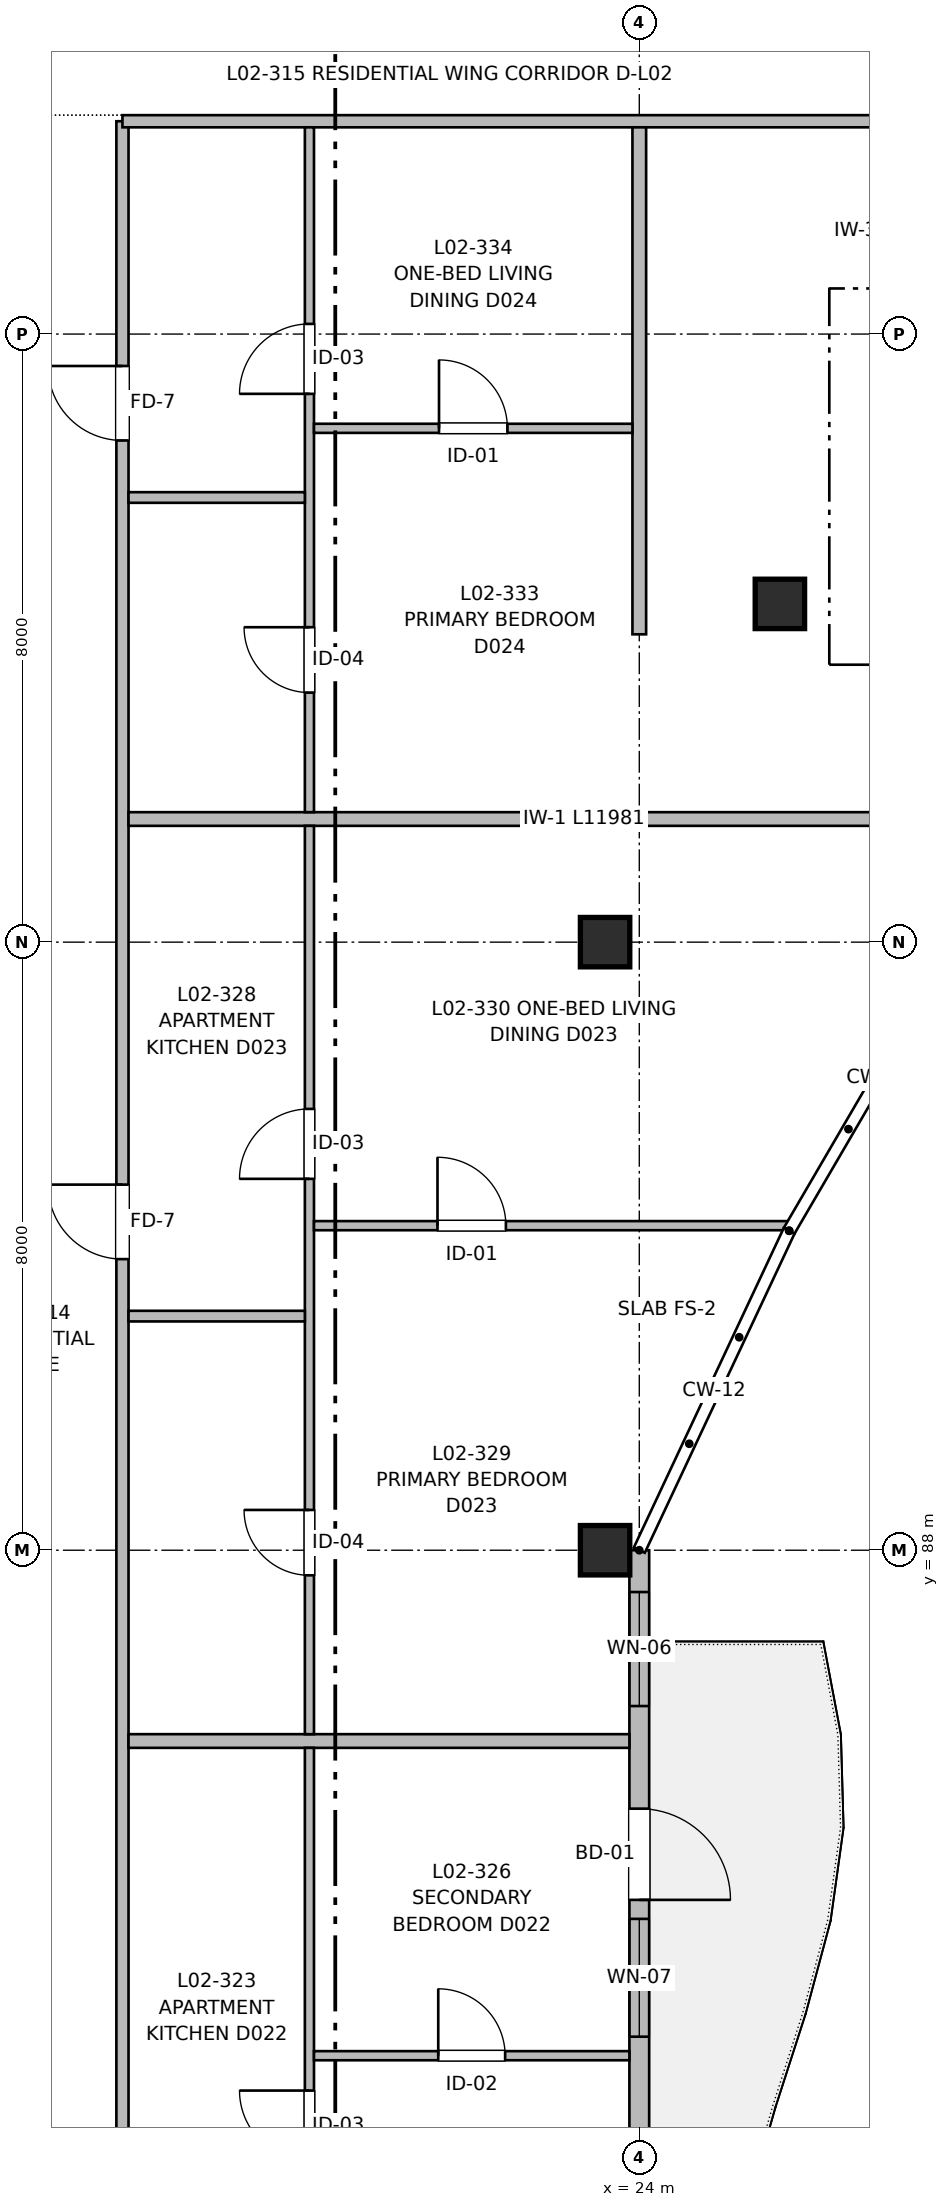
"""IFC4 building model, lengths in metres.
Left out: names, types, materials, properties, quantities, classifications, styles, units other than length and angle.
Written with IfcOpenShell. Run it as: python <this file> out.ifc"""

import sys

from ifc_helpers import new_model, si_unit, direction, frame, frame_2d, origin, origin_2d, place, context, subcontext, project, spatial, rectangle, extrude, element, fill, save


model = new_model("IFC4")
c1 = context("Model", 3, precision=1e-05, world=origin(), true_north=direction((0.0, 1.0)))
c2 = subcontext(c1, "Body", "Model", "MODEL_VIEW")
j1 = project(units=[si_unit("LENGTHUNIT", "METRE"), si_unit("PLANEANGLEUNIT", "RADIAN")], contexts=[c1])
p1 = place(None, origin())
s1 = spatial("IfcSite", under=j1, at=p1, CompositionType="ELEMENT")
p2 = place(p1, origin())
s2 = spatial("IfcBuilding", under=s1, at=p2, CompositionType="ELEMENT")
p3 = place(p2, frame((0.0, 0.0, 7.36)))
s3 = spatial("IfcBuildingStorey", under=s2, at=p3, CompositionType="ELEMENT", Elevation=7.36)
for number, where, z_axis, x_axis in (
    (1, (23.55, 88.0, 0.0), (0.0, 0.0, 1.0), (1.0, 0.0, 0.0)),
    (2, (23.55, 96.0, 0.0), (0.0, 0.0, 1.0), (1.0, 0.0, 0.0)),
    (3, (25.85, 100.45, 0.0), (0.0, 0.0, 1.0), (1.0, 0.0, 0.0)),
):
    element("IfcColumn", number, at=place(p3, frame(where, z_axis=z_axis, x_axis=x_axis)), inside=s3, PredefinedType="COLUMN", context=c2, shape_type="SweptSolid", body=[
        extrude(rectangle(XDim=0.65, YDim=0.65, at=origin_2d()), origin(), (0.0, 0.0, 1.0), 3.2),
    ])
p4 = place(p3, frame((24.0, 88.0, 0.0), z_axis=(0.0, 0.0, 1.0), x_axis=(0.0, -1.0, 0.0)))
e4 = element("IfcWall", 4, at=p4, inside=s3, PredefinedType="SOLIDWALL", context=c2, shape_type="SweptSolid", body=[
    extrude(rectangle(XDim=32.0, YDim=0.26, at=frame_2d((16.0, 0.0))), origin(), (0.0, 0.0, 1.0), 2.98),
])
p5 = place(p4, frame((3.4, 0.0, 0.0)))
e5 = element("IfcOpeningElement", 5, at=p5, cuts=e4, PredefinedType="OPENING", context=c2, shape_type="SweptSolid", body=[
    extrude(rectangle(XDim=1.2, YDim=2.2, at=frame_2d((0.6, 1.1))), frame((0.0, 0.14, 0.0), z_axis=(0.0, -1.0, 0.0), x_axis=(1.0, 0.0, 0.0)), (0.0, 0.0, 1.0), 0.28),
])
p6 = place(p4, frame((4.85, 0.0, 0.82)))
e6 = element("IfcOpeningElement", 6, at=p6, cuts=e4, PredefinedType="OPENING", context=c2, shape_type="SweptSolid", body=[
    extrude(rectangle(XDim=1.55, YDim=1.4, at=frame_2d((0.775, 0.7))), frame((0.0, 0.14, 0.0), z_axis=(0.0, -1.0, 0.0), x_axis=(1.0, 0.0, 0.0)), (0.0, 0.0, 1.0), 0.28),
])
p7 = place(p4, frame((10.4, 0.0, 0.82)))
e7 = element("IfcOpeningElement", 7, at=p7, cuts=e4, PredefinedType="OPENING", context=c2, shape_type="SweptSolid", body=[
    extrude(rectangle(XDim=1.5, YDim=1.4, at=frame_2d((0.75, 0.7))), frame((0.0, 0.14, 0.0), z_axis=(0.0, -1.0, 0.0), x_axis=(1.0, 0.0, 0.0)), (0.0, 0.0, 1.0), 0.28),
])
p8 = place(p4, frame((19.225, 0.0, 0.82)))
e8 = element("IfcOpeningElement", 8, at=p8, cuts=e4, PredefinedType="OPENING", context=c2, shape_type="SweptSolid", body=[
    extrude(rectangle(XDim=1.55, YDim=1.4, at=frame_2d((0.775, 0.7))), frame((0.0, 0.14, 0.0), z_axis=(0.0, -1.0, 0.0), x_axis=(1.0, 0.0, 0.0)), (0.0, 0.0, 1.0), 0.28),
])
p9 = place(p4, frame((27.3, 0.0, 0.87)))
e9 = element("IfcOpeningElement", 9, at=p9, cuts=e4, PredefinedType="OPENING", context=c2, shape_type="SweptSolid", body=[
    extrude(rectangle(XDim=1.4, YDim=1.35, at=frame_2d((0.7, 0.675))), frame((0.0, 0.14, 0.0), z_axis=(0.0, -1.0, 0.0), x_axis=(1.0, 0.0, 0.0)), (0.0, 0.0, 1.0), 0.28),
])
p10 = place(p4, frame((24.493, 0.0, 0.82)))
e10 = element("IfcOpeningElement", 10, at=p10, cuts=e4, PredefinedType="OPENING", context=c2, shape_type="SweptSolid", body=[
    extrude(rectangle(XDim=1.5, YDim=1.4, at=frame_2d((0.75, 0.7))), frame((0.0, 0.14, 0.0), z_axis=(0.0, -1.0, 0.0), x_axis=(1.0, 0.0, 0.0)), (0.0, 0.0, 1.0), 0.28),
])
p11 = place(p4, frame((13.68, 0.0, 0.82)))
e11 = element("IfcOpeningElement", 11, at=p11, cuts=e4, PredefinedType="OPENING", context=c2, shape_type="SweptSolid", body=[
    extrude(rectangle(XDim=1.5, YDim=1.4, at=frame_2d((0.75, 0.7))), frame((0.0, 0.14, 0.0), z_axis=(0.0, -1.0, 0.0), x_axis=(1.0, 0.0, 0.0)), (0.0, 0.0, 1.0), 0.28),
])
p12 = place(p4, frame((0.55, 0.0, 0.82)))
e12 = element("IfcOpeningElement", 12, at=p12, cuts=e4, PredefinedType="OPENING", context=c2, shape_type="SweptSolid", body=[
    extrude(rectangle(XDim=1.5, YDim=1.4, at=frame_2d((0.75, 0.7))), frame((0.0, 0.14, 0.0), z_axis=(0.0, -1.0, 0.0), x_axis=(1.0, 0.0, 0.0)), (0.0, 0.0, 1.0), 0.28),
])
p13 = place(p3, frame((17.2, 56.18, 0.0), z_axis=(0.0, 0.0, 1.0), x_axis=(0.0, 1.0, 0.0)))
e13 = element("IfcWall", 13, at=p13, inside=s3, PredefinedType="PARTITIONING", context=c2, shape_type="SweptSolid", body=[
    extrude(rectangle(XDim=50.62, YDim=0.16, at=frame_2d((25.31, 0.0))), origin(), (0.0, 0.0, 1.0), 2.935),
])
p14 = place(p13, frame((7.68, 0.0, 0.0)))
e14 = element("IfcOpeningElement", 14, at=p14, cuts=e13, PredefinedType="OPENING", context=c2, shape_type="SweptSolid", body=[
    extrude(rectangle(XDim=0.98, YDim=2.15, at=frame_2d((0.49, 1.075))), frame((0.0, 0.09, 0.0), z_axis=(0.0, -1.0, 0.0), x_axis=(1.0, 0.0, 0.0)), (0.0, 0.0, 1.0), 0.18),
])
p15 = place(p13, frame((22.43, 0.0, 0.0)))
e15 = element("IfcOpeningElement", 15, at=p15, cuts=e13, PredefinedType="OPENING", context=c2, shape_type="SweptSolid", body=[
    extrude(rectangle(XDim=0.98, YDim=2.15, at=frame_2d((0.49, 1.075))), frame((0.0, 0.09, 0.0), z_axis=(0.0, -1.0, 0.0), x_axis=(1.0, 0.0, 0.0)), (0.0, 0.0, 1.0), 0.18),
])
p16 = place(p13, frame((35.65, 0.0, 0.0)))
e16 = element("IfcOpeningElement", 16, at=p16, cuts=e13, PredefinedType="OPENING", context=c2, shape_type="SweptSolid", body=[
    extrude(rectangle(XDim=0.98, YDim=2.15, at=frame_2d((0.49, 1.075))), frame((0.0, 0.09, 0.0), z_axis=(0.0, -1.0, 0.0), x_axis=(1.0, 0.0, 0.0)), (0.0, 0.0, 1.0), 0.18),
])
p17 = place(p13, frame((46.42, 0.0, 0.0)))
e17 = element("IfcOpeningElement", 17, at=p17, cuts=e13, PredefinedType="OPENING", context=c2, shape_type="SweptSolid", body=[
    extrude(rectangle(XDim=0.98, YDim=2.15, at=frame_2d((0.49, 1.075))), frame((0.0, 0.09, 0.0), z_axis=(0.0, -1.0, 0.0), x_axis=(1.0, 0.0, 0.0)), (0.0, 0.0, 1.0), 0.18),
])
p18 = place(p3, frame((17.2, 106.8, 0.0), z_axis=(0.0, 0.0, 1.0), x_axis=(1.0, 0.0, 0.0)))
e18 = element("IfcWall", 18, at=p18, inside=s3, PredefinedType="PARTITIONING", context=c2, shape_type="SweptSolid", body=[
    extrude(rectangle(XDim=17.62, YDim=0.16, at=frame_2d((8.81, 0.0))), origin(), (0.0, 0.0, 1.0), 2.935),
])
p19 = place(p18, frame((13.075, 0.0, 0.0)))
e19 = element("IfcOpeningElement", 19, at=p19, cuts=e18, PredefinedType="OPENING", context=c2, shape_type="SweptSolid", body=[
    extrude(rectangle(XDim=1.05, YDim=2.15, at=frame_2d((0.525, 1.075))), frame((0.0, 0.09, 0.0), z_axis=(0.0, -1.0, 0.0), x_axis=(1.0, 0.0, 0.0)), (0.0, 0.0, 1.0), 0.18),
])
p20 = place(p3, frame((24.0, 100.05, 0.0), z_axis=(0.0, 0.0, 1.0), x_axis=(0.0, 1.0, 0.0)))
e20 = element("IfcWall", 20, at=p20, inside=s3, PredefinedType="PARTITIONING", context=c2, shape_type="SweptSolid", body=[
    extrude(rectangle(XDim=6.67, YDim=0.18, at=frame_2d((3.335, 0.0))), origin(), (0.0, 0.0, 1.0), 2.935),
])
p21 = place(p3, frame((17.28, 85.49, 0.0), z_axis=(0.0, 0.0, 1.0), x_axis=(1.0, 0.0, 0.0)))
e21 = element("IfcWall", 21, at=p21, inside=s3, PredefinedType="PARTITIONING", context=c2, shape_type="SweptSolid", body=[
    extrude(rectangle(XDim=6.59, YDim=0.18, at=frame_2d((3.295, 0.0))), origin(), (0.0, 0.0, 1.0), 2.935),
])
p22 = place(p3, frame((17.28, 97.62, 0.0), z_axis=(0.0, 0.0, 1.0), x_axis=(1.0, 0.0, 0.0)))
e22 = element("IfcWall", 22, at=p22, inside=s3, PredefinedType="PARTITIONING", context=c2, shape_type="SweptSolid", body=[
    extrude(rectangle(XDim=11.981, YDim=0.18, at=frame_2d((5.991, 0.0))), origin(), (0.0, 0.0, 1.0), 2.935),
])
p23 = place(p3, frame((19.66, 71.43, 0.0), z_axis=(0.0, 0.0, 1.0), x_axis=(0.0, 1.0, 0.0)))
e23 = element("IfcWall", 23, at=p23, inside=s3, PredefinedType="PARTITIONING", context=c2, shape_type="SweptSolid", body=[
    extrude(rectangle(XDim=13.97, YDim=0.12, at=frame_2d((6.985, 0.0))), origin(), (0.0, 0.0, 1.0), 2.935),
])
p24 = place(p23, frame((2.443, 0.0, 0.0)))
e24 = element("IfcOpeningElement", 24, at=p24, cuts=e23, PredefinedType="OPENING", context=c2, shape_type="SweptSolid", body=[
    extrude(rectangle(XDim=0.86, YDim=2.1, at=frame_2d((0.43, 1.05))), frame((0.0, 0.07, 0.0), z_axis=(0.0, -1.0, 0.0), x_axis=(1.0, 0.0, 0.0)), (0.0, 0.0, 1.0), 0.14),
])
p25 = place(p23, frame((8.541, 0.0, 0.0)))
e25 = element("IfcOpeningElement", 25, at=p25, cuts=e23, PredefinedType="OPENING", context=c2, shape_type="SweptSolid", body=[
    extrude(rectangle(XDim=0.92, YDim=2.1, at=frame_2d((0.46, 1.05))), frame((0.0, 0.07, 0.0), z_axis=(0.0, -1.0, 0.0), x_axis=(1.0, 0.0, 0.0)), (0.0, 0.0, 1.0), 0.14),
])
p26 = place(p3, frame((19.72, 81.35, 0.0), z_axis=(0.0, 0.0, 1.0), x_axis=(1.0, 0.0, 0.0)))
e26 = element("IfcWall", 26, at=p26, inside=s3, PredefinedType="PARTITIONING", context=c2, shape_type="SweptSolid", body=[
    extrude(rectangle(XDim=4.15, YDim=0.12, at=frame_2d((2.075, 0.0))), origin(), (0.0, 0.0, 1.0), 2.935),
])
p27 = place(p26, frame((1.635, 0.0, 0.0)))
e27 = element("IfcOpeningElement", 27, at=p27, cuts=e26, PredefinedType="OPENING", context=c2, shape_type="SweptSolid", body=[
    extrude(rectangle(XDim=0.88, YDim=2.1, at=frame_2d((0.44, 1.05))), frame((0.0, 0.07, 0.0), z_axis=(0.0, -1.0, 0.0), x_axis=(1.0, 0.0, 0.0)), (0.0, 0.0, 1.0), 0.14),
])
p28 = place(p3, frame((19.66, 85.58, 0.0), z_axis=(0.0, 0.0, 1.0), x_axis=(0.0, 1.0, 0.0)))
e28 = element("IfcWall", 28, at=p28, inside=s3, PredefinedType="PARTITIONING", context=c2, shape_type="SweptSolid", body=[
    extrude(rectangle(XDim=11.95, YDim=0.12, at=frame_2d((5.975, 0.0))), origin(), (0.0, 0.0, 1.0), 2.935),
])
p29 = place(p28, frame((2.09, 0.0, 0.0)))
e29 = element("IfcOpeningElement", 29, at=p29, cuts=e28, PredefinedType="OPENING", context=c2, shape_type="SweptSolid", body=[
    extrude(rectangle(XDim=0.86, YDim=2.1, at=frame_2d((0.43, 1.05))), frame((0.0, 0.07, 0.0), z_axis=(0.0, -1.0, 0.0), x_axis=(1.0, 0.0, 0.0)), (0.0, 0.0, 1.0), 0.14),
])
p30 = place(p28, frame((7.306, 0.0, 0.0)))
e30 = element("IfcOpeningElement", 30, at=p30, cuts=e28, PredefinedType="OPENING", context=c2, shape_type="SweptSolid", body=[
    extrude(rectangle(XDim=0.92, YDim=2.1, at=frame_2d((0.46, 1.05))), frame((0.0, 0.07, 0.0), z_axis=(0.0, -1.0, 0.0), x_axis=(1.0, 0.0, 0.0)), (0.0, 0.0, 1.0), 0.14),
])
p31 = place(p3, frame((17.28, 91.08, 0.0), z_axis=(0.0, 0.0, 1.0), x_axis=(1.0, 0.0, 0.0)))
e31 = element("IfcWall", 31, at=p31, inside=s3, PredefinedType="PARTITIONING", context=c2, shape_type="SweptSolid", body=[
    extrude(rectangle(XDim=2.32, YDim=0.14, at=frame_2d((1.16, 0.0))), origin(), (0.0, 0.0, 1.0), 2.935),
])
p32 = place(p3, frame((19.72, 92.27, 0.0), z_axis=(0.0, 0.0, 1.0), x_axis=(1.0, 0.0, 0.0)))
e32 = element("IfcWall", 32, at=p32, inside=s3, PredefinedType="PARTITIONING", context=c2, shape_type="SweptSolid", body=[
    extrude(rectangle(XDim=6.245, YDim=0.12, at=frame_2d((3.123, 0.0))), origin(), (0.0, 0.0, 1.0), 2.935),
])
p33 = place(p32, frame((1.625, 0.0, 0.0)))
e33 = element("IfcOpeningElement", 33, at=p33, cuts=e32, PredefinedType="OPENING", context=c2, shape_type="SweptSolid", body=[
    extrude(rectangle(XDim=0.9, YDim=2.1, at=frame_2d((0.45, 1.05))), frame((0.0, 0.07, 0.0), z_axis=(0.0, -1.0, 0.0), x_axis=(1.0, 0.0, 0.0)), (0.0, 0.0, 1.0), 0.14),
])
p34 = place(p3, frame((19.66, 97.71, 0.0), z_axis=(0.0, 0.0, 1.0), x_axis=(0.0, 1.0, 0.0)))
e34 = element("IfcWall", 34, at=p34, inside=s3, PredefinedType="PARTITIONING", context=c2, shape_type="SweptSolid", body=[
    extrude(rectangle(XDim=9.01, YDim=0.12, at=frame_2d((4.505, 0.0))), origin(), (0.0, 0.0, 1.0), 2.935),
])
p35 = place(p34, frame((1.573, 0.0, 0.0)))
e35 = element("IfcOpeningElement", 35, at=p35, cuts=e34, PredefinedType="OPENING", context=c2, shape_type="SweptSolid", body=[
    extrude(rectangle(XDim=0.86, YDim=2.1, at=frame_2d((0.43, 1.05))), frame((0.0, 0.07, 0.0), z_axis=(0.0, -1.0, 0.0), x_axis=(1.0, 0.0, 0.0)), (0.0, 0.0, 1.0), 0.14),
])
p36 = place(p34, frame((5.504, 0.0, 0.0)))
e36 = element("IfcOpeningElement", 36, at=p36, cuts=e34, PredefinedType="OPENING", context=c2, shape_type="SweptSolid", body=[
    extrude(rectangle(XDim=0.92, YDim=2.1, at=frame_2d((0.46, 1.05))), frame((0.0, 0.07, 0.0), z_axis=(0.0, -1.0, 0.0), x_axis=(1.0, 0.0, 0.0)), (0.0, 0.0, 1.0), 0.14),
])
p37 = place(p3, frame((17.28, 101.85, 0.0), z_axis=(0.0, 0.0, 1.0), x_axis=(1.0, 0.0, 0.0)))
e37 = element("IfcWall", 37, at=p37, inside=s3, PredefinedType="PARTITIONING", context=c2, shape_type="SweptSolid", body=[
    extrude(rectangle(XDim=2.32, YDim=0.14, at=frame_2d((1.16, 0.0))), origin(), (0.0, 0.0, 1.0), 2.935),
])
p38 = place(p3, frame((19.72, 102.76, 0.0), z_axis=(0.0, 0.0, 1.0), x_axis=(1.0, 0.0, 0.0)))
e38 = element("IfcWall", 38, at=p38, inside=s3, PredefinedType="PARTITIONING", context=c2, shape_type="SweptSolid", body=[
    extrude(rectangle(XDim=4.19, YDim=0.12, at=frame_2d((2.095, 0.0))), origin(), (0.0, 0.0, 1.0), 2.935),
])
p39 = place(p38, frame((1.645, 0.0, 0.0)))
e39 = element("IfcOpeningElement", 39, at=p39, cuts=e38, PredefinedType="OPENING", context=c2, shape_type="SweptSolid", body=[
    extrude(rectangle(XDim=0.9, YDim=2.1, at=frame_2d((0.45, 1.05))), frame((0.0, 0.07, 0.0), z_axis=(0.0, -1.0, 0.0), x_axis=(1.0, 0.0, 0.0)), (0.0, 0.0, 1.0), 0.14),
])
p40 = place(p5, origin())
e40 = element("IfcDoor", 40, at=p40, inside=s3, OperationType="SINGLE_SWING_RIGHT", PredefinedType="DOOR", context=c2, shape_type="SweptSolid", body=[
    extrude(rectangle(XDim=1.2, YDim=2.2, at=frame_2d((0.6, 1.1))), frame((0.0, 0.025, 0.0), z_axis=(0.0, -1.0, 0.0), x_axis=(1.0, 0.0, 0.0)), (0.0, 0.0, 1.0), 0.05),
])
fill(e5, e40)
p41 = place(p6, origin())
e41 = element("IfcWindow", 41, at=p41, inside=s3, PartitioningType="SINGLE_PANEL", PredefinedType="WINDOW", context=c2, shape_type="SweptSolid", body=[
    extrude(rectangle(XDim=1.55, YDim=1.4, at=frame_2d((0.775, 0.7))), frame((0.0, 0.03, 0.0), z_axis=(0.0, -1.0, 0.0), x_axis=(1.0, 0.0, 0.0)), (0.0, 0.0, 1.0), 0.06),
])
fill(e6, e41)
p42 = place(p25, origin())
e42 = element("IfcDoor", 42, at=p42, inside=s3, OperationType="SINGLE_SWING_RIGHT", PredefinedType="DOOR", context=c2, shape_type="SweptSolid", body=[
    extrude(rectangle(XDim=0.92, YDim=2.1, at=frame_2d((0.46, 1.05))), frame((0.0, 0.025, 0.0), z_axis=(0.0, -1.0, 0.0), x_axis=(1.0, 0.0, 0.0)), (0.0, 0.0, 1.0), 0.05),
])
fill(e25, e42)
p43 = place(p27, origin())
e43 = element("IfcDoor", 43, at=p43, inside=s3, OperationType="SINGLE_SWING_LEFT", PredefinedType="DOOR", context=c2, shape_type="SweptSolid", body=[
    extrude(rectangle(XDim=0.88, YDim=2.1, at=frame_2d((0.44, 1.05))), frame((0.0, 0.025, 0.0), z_axis=(0.0, -1.0, 0.0), x_axis=(1.0, 0.0, 0.0)), (0.0, 0.0, 1.0), 0.05),
])
fill(e27, e43)
p44 = place(p29, origin())
e44 = element("IfcDoor", 44, at=p44, inside=s3, OperationType="SINGLE_SWING_RIGHT", PredefinedType="DOOR", context=c2, shape_type="SweptSolid", body=[
    extrude(rectangle(XDim=0.86, YDim=2.1, at=frame_2d((0.43, 1.05))), frame((0.0, 0.025, 0.0), z_axis=(0.0, -1.0, 0.0), x_axis=(1.0, 0.0, 0.0)), (0.0, 0.0, 1.0), 0.05),
])
fill(e29, e44)
p45 = place(p30, origin())
e45 = element("IfcDoor", 45, at=p45, inside=s3, OperationType="SINGLE_SWING_LEFT", PredefinedType="DOOR", context=c2, shape_type="SweptSolid", body=[
    extrude(rectangle(XDim=0.92, YDim=2.1, at=frame_2d((0.46, 1.05))), frame((0.0, 0.025, 0.0), z_axis=(0.0, -1.0, 0.0), x_axis=(1.0, 0.0, 0.0)), (0.0, 0.0, 1.0), 0.05),
])
fill(e30, e45)
p46 = place(p16, origin())
e46 = element("IfcDoor", 46, at=p46, inside=s3, OperationType="SINGLE_SWING_RIGHT", PredefinedType="DOOR", context=c2, shape_type="SweptSolid", body=[
    extrude(rectangle(XDim=0.98, YDim=2.15, at=frame_2d((0.49, 1.075))), frame((0.0, 0.025, 0.0), z_axis=(0.0, -1.0, 0.0), x_axis=(1.0, 0.0, 0.0)), (0.0, 0.0, 1.0), 0.05),
])
fill(e16, e46)
p47 = place(p33, origin())
e47 = element("IfcDoor", 47, at=p47, inside=s3, OperationType="SINGLE_SWING_LEFT", PredefinedType="DOOR", context=c2, shape_type="SweptSolid", body=[
    extrude(rectangle(XDim=0.9, YDim=2.1, at=frame_2d((0.45, 1.05))), frame((0.0, 0.025, 0.0), z_axis=(0.0, -1.0, 0.0), x_axis=(1.0, 0.0, 0.0)), (0.0, 0.0, 1.0), 0.05),
])
fill(e33, e47)
p48 = place(p35, origin())
e48 = element("IfcDoor", 48, at=p48, inside=s3, OperationType="SINGLE_SWING_RIGHT", PredefinedType="DOOR", context=c2, shape_type="SweptSolid", body=[
    extrude(rectangle(XDim=0.86, YDim=2.1, at=frame_2d((0.43, 1.05))), frame((0.0, 0.025, 0.0), z_axis=(0.0, -1.0, 0.0), x_axis=(1.0, 0.0, 0.0)), (0.0, 0.0, 1.0), 0.05),
])
fill(e35, e48)
p49 = place(p36, origin())
e49 = element("IfcDoor", 49, at=p49, inside=s3, OperationType="SINGLE_SWING_LEFT", PredefinedType="DOOR", context=c2, shape_type="SweptSolid", body=[
    extrude(rectangle(XDim=0.92, YDim=2.1, at=frame_2d((0.46, 1.05))), frame((0.0, 0.025, 0.0), z_axis=(0.0, -1.0, 0.0), x_axis=(1.0, 0.0, 0.0)), (0.0, 0.0, 1.0), 0.05),
])
fill(e36, e49)
p50 = place(p17, origin())
e50 = element("IfcDoor", 50, at=p50, inside=s3, OperationType="SINGLE_SWING_RIGHT", PredefinedType="DOOR", context=c2, shape_type="SweptSolid", body=[
    extrude(rectangle(XDim=0.98, YDim=2.15, at=frame_2d((0.49, 1.075))), frame((0.0, 0.025, 0.0), z_axis=(0.0, -1.0, 0.0), x_axis=(1.0, 0.0, 0.0)), (0.0, 0.0, 1.0), 0.05),
])
fill(e17, e50)
p51 = place(p39, origin())
e51 = element("IfcDoor", 51, at=p51, inside=s3, OperationType="SINGLE_SWING_LEFT", PredefinedType="DOOR", context=c2, shape_type="SweptSolid", body=[
    extrude(rectangle(XDim=0.9, YDim=2.1, at=frame_2d((0.45, 1.05))), frame((0.0, 0.025, 0.0), z_axis=(0.0, -1.0, 0.0), x_axis=(1.0, 0.0, 0.0)), (0.0, 0.0, 1.0), 0.05),
])
fill(e39, e51)
p52 = place(p12, origin())
e52 = element("IfcWindow", 52, at=p52, inside=s3, PartitioningType="SINGLE_PANEL", PredefinedType="WINDOW", context=c2, shape_type="SweptSolid", body=[
    extrude(rectangle(XDim=1.5, YDim=1.4, at=frame_2d((0.75, 0.7))), frame((0.0, 0.03, 0.0), z_axis=(0.0, -1.0, 0.0), x_axis=(1.0, 0.0, 0.0)), (0.0, 0.0, 1.0), 0.06),
])
fill(e12, e52)
save(model, sys.argv[1])
